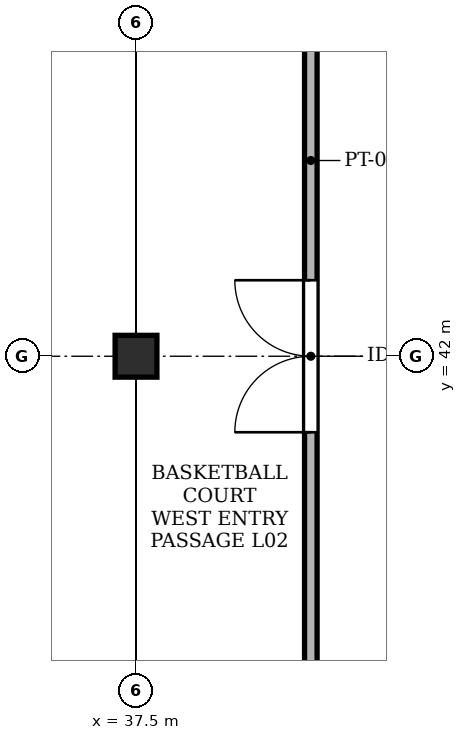
"""IFC4 building model, lengths in metres.
Left out: names, types, materials, properties, quantities, classifications, styles, units other than length and angle.
Written with IfcOpenShell. Run it as: python <this file> out.ifc"""

import sys

from ifc_helpers import new_model, si_unit, direction, frame, frame_2d, origin, origin_2d, place, context, subcontext, project, spatial, rectangle, extrude, element, fill, save


model = new_model("IFC4")
c1 = context("Model", 3, precision=1e-05, world=origin(), true_north=direction((0.0, 1.0)))
c2 = subcontext(c1, "Body", "Model", "MODEL_VIEW")
j1 = project(units=[si_unit("LENGTHUNIT", "METRE"), si_unit("PLANEANGLEUNIT", "RADIAN")], contexts=[c1])
p1 = place(None, origin())
s1 = spatial("IfcSite", under=j1, at=p1, CompositionType="ELEMENT")
p2 = place(p1, origin())
s2 = spatial("IfcBuilding", under=s1, at=p2, CompositionType="ELEMENT")
p3 = place(p2, frame((0.0, 0.0, 9.4)))
s3 = spatial("IfcBuildingStorey", under=s2, at=p3, CompositionType="ELEMENT", Elevation=9.4)
p4 = place(p3, frame((37.5, 42.0, -0.45), z_axis=(0.0, 0.0, 1.0), x_axis=(1.0, 0.0, 0.0)))
e1 = element("IfcColumn", 1, at=p4, inside=s3, PredefinedType="COLUMN", context=c2, shape_type="SweptSolid", body=[
    extrude(rectangle(XDim=0.55, YDim=0.55, at=origin_2d()), origin(), (0.0, 0.0, 1.0), 4.77),
])
p5 = place(p3, frame((39.8, 28.95, 0.0), z_axis=(0.0, 0.0, 1.0), x_axis=(0.0, 1.0, 0.0)))
e2 = element("IfcWall", 2, at=p5, inside=s3, PredefinedType="PARTITIONING", context=c2, shape_type="SweptSolid", body=[
    extrude(rectangle(XDim=26.1, YDim=0.165, at=frame_2d((13.05, 0.0))), origin(), (0.0, 0.0, 1.0), 3.88),
])
p6 = place(p5, frame((12.05, 0.0, 0.0)))
e3 = element("IfcOpeningElement", 3, at=p6, cuts=e2, PredefinedType="OPENING", context=c2, shape_type="SweptSolid", body=[
    extrude(rectangle(XDim=2.0, YDim=2.35, at=frame_2d((1.0, 1.175))), frame((0.0, 0.094, 0.0), z_axis=(0.0, -1.0, 0.0), x_axis=(1.0, 0.0, 0.0)), (0.0, 0.0, 1.0), 0.189),
])
p7 = place(p6, origin())
e4 = element("IfcDoor", 4, at=p7, inside=s3, OperationType="DOUBLE_DOOR_SINGLE_SWING", PredefinedType="DOOR", context=c2, shape_type="SweptSolid", body=[
    extrude(rectangle(XDim=2.0, YDim=2.35, at=frame_2d((1.0, 1.175))), frame((0.0, 0.025, 0.0), z_axis=(0.0, -1.0, 0.0), x_axis=(1.0, 0.0, 0.0)), (0.0, 0.0, 1.0), 0.05),
])
fill(e3, e4)
save(model, sys.argv[1])
